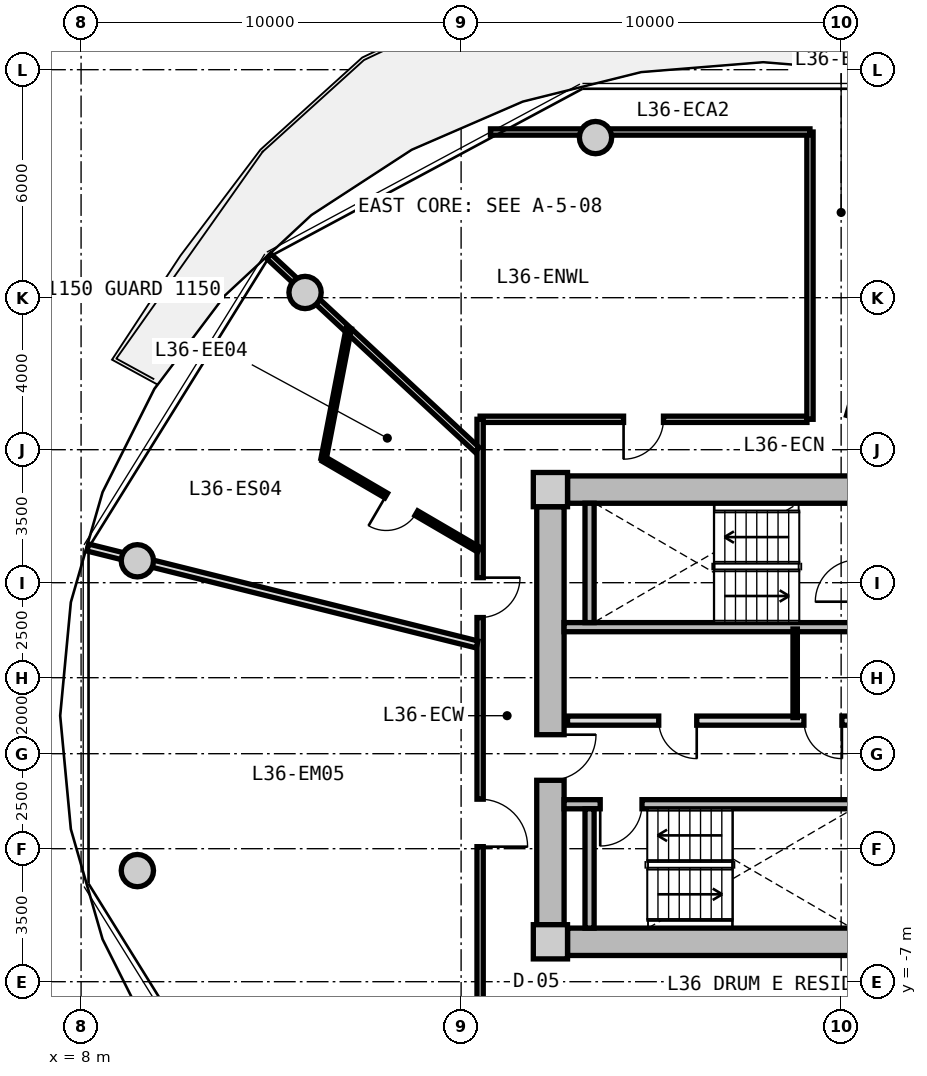
"""IFC4 building model, lengths in metres.
Left out: names, types, materials, properties, quantities, classifications, styles, units other than length and angle.
Written with IfcOpenShell. Run it as: python <this file> out.ifc"""

import sys

from ifc_helpers import new_model, si_unit, direction, frame, frame_2d, origin, origin_2d, place, context, subcontext, project, spatial, rectangle, circle, extrude, source, transform, mapped, element, fill, save


model = new_model("IFC4")
c1 = context("Model", 3, precision=1e-05, world=origin(), true_north=direction((0.0, 1.0)))
c2 = subcontext(c1, "Body", "Model", "MODEL_VIEW")
j1 = project(units=[si_unit("LENGTHUNIT", "METRE"), si_unit("PLANEANGLEUNIT", "RADIAN")], contexts=[c1])
p1 = place(None, origin())
s1 = spatial("IfcSite", under=j1, at=p1, CompositionType="ELEMENT")
p2 = place(p1, origin())
s2 = spatial("IfcBuilding", under=s1, at=p2, CompositionType="ELEMENT")
p3 = place(p2, frame((0.0, 0.0, 117.6)))
s3 = spatial("IfcBuildingStorey", under=s2, at=p3, CompositionType="ELEMENT", Elevation=117.6)
m1 = source(origin(), c2, "Body", "SweptSolid", [
    extrude(rectangle(XDim=0.9, YDim=0.9, at=origin_2d()), origin(), (0.0, 0.0, 1.0), 3.05),
])
for number, where, z_axis, x_axis in (
    (1, (20.35, -5.95, 0.0), (0.0, 0.0, 1.0), (1.0, 0.0, 0.0)),
    (2, (20.35, 5.95, 0.0), (0.0, 0.0, 1.0), (1.0, 0.0, 0.0)),
):
    element("IfcColumn", number, at=place(p3, frame(where, z_axis=z_axis, x_axis=x_axis)), inside=s3, PredefinedType="COLUMN", context=c2, shape_type="MappedRepresentation", body=[
        mapped(m1, transform((0.0, 0.0, 0.0), x_axis=(1.0, 0.0, 0.0), y_axis=(0.0, 1.0, 0.0), z_axis=(0.0, 0.0, 1.0), scale=1.0)),
    ])
m2 = source(origin(), c2, "Body", "SweptSolid", [
    extrude(rectangle(XDim=14.4, YDim=0.72, at=frame_2d((7.2, 0.0))), origin(), (0.0, 0.0, 1.0), 2.79),
])
for number, where, z_axis, x_axis in (
    (3, (20.8, 5.95, 0.0), (0.0, 0.0, 1.0), (1.0, 0.0, 0.0)),
    (4, (35.2, -5.95, 0.0), (0.0, 0.0, 1.0), (-1.0, 0.0, 0.0)),
):
    element("IfcWall", number, at=place(p3, frame(where, z_axis=z_axis, x_axis=x_axis)), inside=s3, PredefinedType="SHEAR", context=c2, shape_type="MappedRepresentation", body=[
        mapped(m2, transform((0.0, 0.0, 0.0), x_axis=(1.0, 0.0, 0.0), y_axis=(0.0, 1.0, 0.0), z_axis=(0.0, 0.0, 1.0), scale=1.0)),
    ])
m3 = source(origin(), c2, "Body", "SweptSolid", [
    extrude(rectangle(XDim=11.0, YDim=0.72, at=frame_2d((5.5, 0.0))), origin(), (0.0, 0.0, 1.0), 2.79),
])
p4 = place(p3, frame((20.35, -5.5, 0.0), z_axis=(0.0, 0.0, 1.0), x_axis=(0.0, 1.0, 0.0)))
e5 = element("IfcWall", 5, at=p4, inside=s3, PredefinedType="SHEAR", context=c2, shape_type="MappedRepresentation", body=[
    mapped(m3, transform((0.0, 0.0, 0.0), x_axis=(1.0, 0.0, 0.0), y_axis=(0.0, 1.0, 0.0), z_axis=(0.0, 0.0, 1.0), scale=1.0)),
])
p5 = place(p4, frame((3.8, 0.0, 0.0)))
e6 = element("IfcOpeningElement", 6, at=p5, cuts=e5, PredefinedType="OPENING", context=c2, shape_type="SweptSolid", body=[
    extrude(rectangle(XDim=1.2, YDim=2.15, at=frame_2d((0.6, 1.075))), frame((0.0, 0.37, 0.0), z_axis=(0.0, -1.0, 0.0), x_axis=(1.0, 0.0, 0.0)), (0.0, 0.0, 1.0), 0.74),
])
m4 = source(origin(), c2, "Body", "SweptSolid", [
    extrude(circle(Radius=0.425, at=origin_2d()), origin(), (0.0, 0.0, 1.0), 3.05),
])
for number, where, z_axis, x_axis in (
    (7, (21.537, 15.213, 0.0), (0.0, 0.0, 1.0), (1.0, 0.0, 0.0)),
    (8, (13.894, 11.137, 0.0), (0.0, 0.0, 1.0), (1.0, 0.0, 0.0)),
    (9, (9.481, 4.076, 0.0), (0.0, 0.0, 1.0), (1.0, 0.0, 0.0)),
    (10, (9.481, -4.076, 0.0), (0.0, 0.0, 1.0), (1.0, 0.0, 0.0)),
):
    element("IfcColumn", number, at=place(p3, frame(where, z_axis=z_axis, x_axis=x_axis)), inside=s3, PredefinedType="COLUMN", context=c2, shape_type="MappedRepresentation", body=[
        mapped(m4, transform((0.0, 0.0, 0.0), x_axis=(1.0, 0.0, 0.0), y_axis=(0.0, 1.0, 0.0), z_axis=(0.0, 0.0, 1.0), scale=1.0)),
    ])
m5 = source(origin(), c2, "Body", "SweptSolid", [
    extrude(rectangle(XDim=7.83, YDim=0.24, at=frame_2d((3.915, 0.0))), origin(), (0.0, 0.0, 1.0), 2.79),
])
p6 = place(p3, frame((20.71, 2.33, 0.0), z_axis=(0.0, 0.0, 1.0), x_axis=(1.0, 0.0, 0.0)))
e11 = element("IfcWall", 11, at=p6, inside=s3, PredefinedType="PARTITIONING", context=c2, shape_type="MappedRepresentation", body=[
    mapped(m5, transform((0.0, 0.0, 0.0), x_axis=(1.0, 0.0, 0.0), y_axis=(0.0, 1.0, 0.0), z_axis=(0.0, 0.0, 1.0), scale=1.0)),
])
m6 = source(origin(), c2, "Body", "SweptSolid", [
    extrude(rectangle(XDim=3.14, YDim=0.24, at=frame_2d((1.57, 0.0))), origin(), (0.0, 0.0, 1.0), 2.79),
])
p7 = place(p3, frame((21.38, 2.45, 0.0), z_axis=(0.0, 0.0, 1.0), x_axis=(0.0, 1.0, 0.0)))
e12 = element("IfcWall", 12, at=p7, inside=s3, PredefinedType="PARTITIONING", context=c2, shape_type="MappedRepresentation", body=[
    mapped(m6, transform((0.0, 0.0, 0.0), x_axis=(1.0, 0.0, 0.0), y_axis=(0.0, 1.0, 0.0), z_axis=(0.0, 0.0, 1.0), scale=1.0)),
])
p8 = place(p3, frame((20.71, -2.33, 0.0), z_axis=(0.0, 0.0, 1.0), x_axis=(1.0, 0.0, 0.0)))
e13 = element("IfcWall", 13, at=p8, inside=s3, PredefinedType="PARTITIONING", context=c2, shape_type="MappedRepresentation", body=[
    mapped(m5, transform((0.0, 0.0, 0.0), x_axis=(1.0, 0.0, 0.0), y_axis=(0.0, 1.0, 0.0), z_axis=(0.0, 0.0, 1.0), scale=1.0)),
])
p9 = place(p8, frame((0.95, 0.0, 0.0)))
e14 = element("IfcOpeningElement", 14, at=p9, cuts=e13, PredefinedType="OPENING", context=c2, shape_type="SweptSolid", body=[
    extrude(rectangle(XDim=1.1, YDim=2.15, at=frame_2d((0.55, 1.075))), frame((0.0, 0.13, 0.0), z_axis=(0.0, -1.0, 0.0), x_axis=(1.0, 0.0, 0.0)), (0.0, 0.0, 1.0), 0.26),
])
p10 = place(p3, frame((21.38, -5.59, 0.0), z_axis=(0.0, 0.0, 1.0), x_axis=(0.0, 1.0, 0.0)))
e15 = element("IfcWall", 15, at=p10, inside=s3, PredefinedType="PARTITIONING", context=c2, shape_type="MappedRepresentation", body=[
    mapped(m6, transform((0.0, 0.0, 0.0), x_axis=(1.0, 0.0, 0.0), y_axis=(0.0, 1.0, 0.0), z_axis=(0.0, 0.0, 1.0), scale=1.0)),
])
m7 = source(origin(), c2, "Body", "SweptSolid", [
    extrude(rectangle(XDim=7.62, YDim=0.24, at=frame_2d((3.81, 0.0))), origin(), (0.0, 0.0, 1.0), 2.775),
])
p11 = place(p3, frame((20.8, -0.13, 0.0), z_axis=(0.0, 0.0, 1.0), x_axis=(1.0, 0.0, 0.0)))
e16 = element("IfcWall", 16, at=p11, inside=s3, PredefinedType="PARTITIONING", context=c2, shape_type="MappedRepresentation", body=[
    mapped(m7, transform((0.0, 0.0, 0.0), x_axis=(1.0, 0.0, 0.0), y_axis=(0.0, 1.0, 0.0), z_axis=(0.0, 0.0, 1.0), scale=1.0)),
])
p12 = place(p11, frame((6.22, 0.0, 0.0)))
e17 = element("IfcOpeningElement", 17, at=p12, cuts=e16, PredefinedType="OPENING", context=c2, shape_type="SweptSolid", body=[
    extrude(rectangle(XDim=1.0, YDim=2.1, at=frame_2d((0.5, 1.05))), frame((0.0, 0.13, 0.0), z_axis=(0.0, -1.0, 0.0), x_axis=(1.0, 0.0, 0.0)), (0.0, 0.0, 1.0), 0.26),
])
p13 = place(p11, frame((2.4, 0.0, 0.0)))
e18 = element("IfcOpeningElement", 18, at=p13, cuts=e16, PredefinedType="OPENING", context=c2, shape_type="SweptSolid", body=[
    extrude(rectangle(XDim=1.0, YDim=2.1, at=frame_2d((0.5, 1.05))), frame((0.0, 0.13, 0.0), z_axis=(0.0, -1.0, 0.0), x_axis=(1.0, 0.0, 0.0)), (0.0, 0.0, 1.0), 0.26),
])
m8 = source(origin(), c2, "Body", "SweptSolid", [
    extrude(rectangle(XDim=2.33, YDim=0.115, at=frame_2d((1.165, 0.0))), origin(), (0.0, 0.0, 1.0), 2.775),
])
p14 = place(p3, frame((26.79, -0.05, 0.0), z_axis=(0.0, 0.0, 1.0), x_axis=(0.0, 1.0, 0.0)))
e19 = element("IfcWall", 19, at=p14, inside=s3, PredefinedType="PARTITIONING", context=c2, shape_type="MappedRepresentation", body=[
    mapped(m8, transform((0.0, 0.0, 0.0), x_axis=(1.0, 0.0, 0.0), y_axis=(0.0, 1.0, 0.0), z_axis=(0.0, 0.0, 1.0), scale=1.0)),
])
m9 = source(origin(), c2, "Body", "SweptSolid", [
    extrude(rectangle(XDim=8.6, YDim=0.165, at=frame_2d((4.3, 0.0))), origin(), (0.0, 0.0, 1.0), 2.775),
])
p15 = place(p3, frame((18.5, 7.8, 0.0), z_axis=(0.0, 0.0, 1.0), x_axis=(1.0, 0.0, 0.0)))
e20 = element("IfcWall", 20, at=p15, inside=s3, PredefinedType="PARTITIONING", context=c2, shape_type="MappedRepresentation", body=[
    mapped(m9, transform((0.0, 0.0, 0.0), x_axis=(1.0, 0.0, 0.0), y_axis=(0.0, 1.0, 0.0), z_axis=(0.0, 0.0, 1.0), scale=1.0)),
])
p16 = place(p15, frame((3.775, 0.0, 0.0)))
e21 = element("IfcOpeningElement", 21, at=p16, cuts=e20, PredefinedType="OPENING", context=c2, shape_type="SweptSolid", body=[
    extrude(rectangle(XDim=1.05, YDim=2.15, at=frame_2d((0.525, 1.075))), frame((0.0, 0.093, 0.0), z_axis=(0.0, -1.0, 0.0), x_axis=(1.0, 0.0, 0.0)), (0.0, 0.0, 1.0), 0.185),
])
m10 = source(origin(), c2, "Body", "SweptSolid", [
    extrude(rectangle(XDim=15.6, YDim=0.165, at=frame_2d((7.8, 0.0))), origin(), (0.0, 0.0, 1.0), 2.775),
])
p17 = place(p3, frame((18.5, -7.8, 0.0), z_axis=(0.0, 0.0, 1.0), x_axis=(0.0, 1.0, 0.0)))
e22 = element("IfcWall", 22, at=p17, inside=s3, PredefinedType="PARTITIONING", context=c2, shape_type="MappedRepresentation", body=[
    mapped(m10, transform((0.0, 0.0, 0.0), x_axis=(1.0, 0.0, 0.0), y_axis=(0.0, 1.0, 0.0), z_axis=(0.0, 0.0, 1.0), scale=1.0)),
])
p18 = place(p17, frame((10.383, 0.0, 0.0)))
e23 = element("IfcOpeningElement", 23, at=p18, cuts=e22, PredefinedType="OPENING", context=c2, shape_type="SweptSolid", body=[
    extrude(rectangle(XDim=1.05, YDim=2.15, at=frame_2d((0.525, 1.075))), frame((0.0, 0.093, 0.0), z_axis=(0.0, -1.0, 0.0), x_axis=(1.0, 0.0, 0.0)), (0.0, 0.0, 1.0), 0.185),
])
p19 = place(p17, frame((4.353, 0.0, 0.0)))
e24 = element("IfcOpeningElement", 24, at=p19, cuts=e22, PredefinedType="OPENING", context=c2, shape_type="SweptSolid", body=[
    extrude(rectangle(XDim=1.25, YDim=2.2, at=frame_2d((0.625, 1.1))), frame((0.0, 0.093, 0.0), z_axis=(0.0, -1.0, 0.0), x_axis=(1.0, 0.0, 0.0)), (0.0, 0.0, 1.0), 0.185),
])
m11 = source(origin(), c2, "Body", "SweptSolid", [
    extrude(rectangle(XDim=8.989, YDim=0.165, at=frame_2d((4.495, 0.0))), origin(), (0.0, 0.0, 1.0), 2.415),
])
p20 = place(p3, frame((28.222, 7.88, 0.0), z_axis=(0.0, 0.0, 1.0), x_axis=(0.27702323008, 0.960863221274, 0.0)))
e25 = element("IfcWall", 25, at=p20, inside=s3, PredefinedType="PARTITIONING", context=c2, shape_type="MappedRepresentation", body=[
    mapped(m11, transform((0.0, 0.0, 0.0), x_axis=(1.0, 0.0, 0.0), y_axis=(0.0, 1.0, 0.0), z_axis=(0.0, 0.0, 1.0), scale=1.0)),
])
m12 = source(origin(), c2, "Body", "SweptSolid", [
    extrude(rectangle(XDim=7.482, YDim=0.165, at=frame_2d((3.741, 0.0))), origin(), (0.0, 0.0, 1.0), 2.275),
])
p21 = place(p3, frame((18.42, 6.998, 0.0), z_axis=(0.0, 0.0, 1.0), x_axis=(-0.732508698043, 0.680757671489, 0.0)))
e26 = element("IfcWall", 26, at=p21, inside=s3, PredefinedType="PARTITIONING", context=c2, shape_type="MappedRepresentation", body=[
    mapped(m12, transform((0.0, 0.0, 0.0), x_axis=(1.0, 0.0, 0.0), y_axis=(0.0, 1.0, 0.0), z_axis=(0.0, 0.0, 1.0), scale=1.0)),
])
m13 = source(origin(), c2, "Body", "SweptSolid", [
    extrude(rectangle(XDim=7.56, YDim=0.165, at=frame_2d((3.78, 0.0))), origin(), (0.0, 0.0, 1.0), 2.775),
])
p22 = place(p3, frame((27.18, 7.8, 0.0), z_axis=(0.0, 0.0, 1.0), x_axis=(0.0, 1.0, 0.0)))
e27 = element("IfcWall", 27, at=p22, inside=s3, PredefinedType="PARTITIONING", context=c2, shape_type="MappedRepresentation", body=[
    mapped(m13, transform((0.0, 0.0, 0.0), x_axis=(1.0, 0.0, 0.0), y_axis=(0.0, 1.0, 0.0), z_axis=(0.0, 0.0, 1.0), scale=1.0)),
])
m14 = source(origin(), c2, "Body", "SweptSolid", [
    extrude(rectangle(XDim=8.407, YDim=0.165, at=frame_2d((4.204, 0.0))), origin(), (0.0, 0.0, 1.0), 2.275),
])
p23 = place(p3, frame((18.773, 15.36, 0.0), z_axis=(0.0, 0.0, 1.0), x_axis=(1.0, 0.0, 0.0)))
e28 = element("IfcWall", 28, at=p23, inside=s3, PredefinedType="PARTITIONING", context=c2, shape_type="MappedRepresentation", body=[
    mapped(m14, transform((0.0, 0.0, 0.0), x_axis=(1.0, 0.0, 0.0), y_axis=(0.0, 1.0, 0.0), z_axis=(0.0, 0.0, 1.0), scale=1.0)),
])
m15 = source(origin(), c2, "Body", "SweptSolid", [
    extrude(rectangle(XDim=10.556, YDim=0.19, at=frame_2d((5.278, 0.0))), origin(), (0.0, 0.0, 1.0), 2.275),
])
p24 = place(p3, frame((18.42, 1.875, 0.0), z_axis=(0.0, 0.0, 1.0), x_axis=(-0.970363857851, 0.241648470667, 0.0)))
e29 = element("IfcWall", 29, at=p24, inside=s3, PredefinedType="PARTITIONING", context=c2, shape_type="MappedRepresentation", body=[
    mapped(m15, transform((0.0, 0.0, 0.0), x_axis=(1.0, 0.0, 0.0), y_axis=(0.0, 1.0, 0.0), z_axis=(0.0, 0.0, 1.0), scale=1.0)),
])
m16 = source(origin(), c2, "Body", "SweptSolid", [
    extrude(rectangle(XDim=4.735, YDim=0.14, at=frame_2d((2.368, 0.0))), origin(), (0.0, 0.0, 1.0), 2.775),
])
p25 = place(p3, frame((18.47, 4.368, 0.0), z_axis=(0.0, 0.0, 1.0), x_axis=(-0.863537576642, 0.504284496814, 0.0)))
e30 = element("IfcWall", 30, at=p25, inside=s3, PredefinedType="PARTITIONING", context=c2, shape_type="MappedRepresentation", body=[
    mapped(m16, transform((0.0, 0.0, 0.0), x_axis=(1.0, 0.0, 0.0), y_axis=(0.0, 1.0, 0.0), z_axis=(0.0, 0.0, 1.0), scale=1.0)),
])
p26 = place(p25, frame((1.908, 0.0, 0.0)))
e31 = element("IfcOpeningElement", 31, at=p26, cuts=e30, PredefinedType="OPENING", context=c2, shape_type="SweptSolid", body=[
    extrude(rectangle(XDim=0.92, YDim=2.1, at=frame_2d((0.46, 1.05))), frame((0.0, 0.08, 0.0), z_axis=(0.0, -1.0, 0.0), x_axis=(1.0, 0.0, 0.0)), (0.0, 0.0, 1.0), 0.16),
])
m17 = source(origin(), c2, "Body", "SweptSolid", [
    extrude(rectangle(XDim=3.499, YDim=0.14, at=frame_2d((1.75, 0.0))), origin(), (0.0, 0.0, 1.0), 2.775),
])
p27 = place(p3, frame((14.381, 6.756, 0.0), z_axis=(0.0, 0.0, 1.0), x_axis=(0.18957713629, 0.981865830649, 0.0)))
e32 = element("IfcWall", 32, at=p27, inside=s3, PredefinedType="PARTITIONING", context=c2, shape_type="MappedRepresentation", body=[
    mapped(m17, transform((0.0, 0.0, 0.0), x_axis=(1.0, 0.0, 0.0), y_axis=(0.0, 1.0, 0.0), z_axis=(0.0, 0.0, 1.0), scale=1.0)),
])
m18 = source(origin(), c2, "Body", "SweptSolid", [
    extrude(rectangle(XDim=1.1, YDim=2.15, at=frame_2d((0.55, 1.075))), frame((0.0, 0.025, 0.0), z_axis=(0.0, -1.0, 0.0), x_axis=(1.0, 0.0, 0.0)), (0.0, 0.0, 1.0), 0.05),
])
p28 = place(p9, frame((1.1, 0.0, 0.0), z_axis=(0.0, 0.0, 1.0), x_axis=(-1.0, 0.0, 0.0)))
e33 = element("IfcDoor", 33, at=p28, inside=s3, OperationType="SINGLE_SWING_RIGHT", PredefinedType="DOOR", context=c2, shape_type="MappedRepresentation", body=[
    mapped(m18, transform((0.0, 0.0, 0.0), x_axis=(1.0, 0.0, 0.0), y_axis=(0.0, 1.0, 0.0), z_axis=(0.0, 0.0, 1.0), scale=1.0)),
])
fill(e14, e33)
m19 = source(origin(), c2, "Body", "SweptSolid", [
    extrude(rectangle(XDim=1.2, YDim=2.15, at=frame_2d((0.6, 1.075))), frame((0.0, 0.025, 0.0), z_axis=(0.0, -1.0, 0.0), x_axis=(1.0, 0.0, 0.0)), (0.0, 0.0, 1.0), 0.05),
])
p29 = place(p5, frame((1.2, 0.0, 0.0), z_axis=(0.0, 0.0, 1.0), x_axis=(-1.0, 0.0, 0.0)))
e34 = element("IfcDoor", 34, at=p29, inside=s3, OperationType="SINGLE_SWING_LEFT", PredefinedType="DOOR", context=c2, shape_type="MappedRepresentation", body=[
    mapped(m19, transform((0.0, 0.0, 0.0), x_axis=(1.0, 0.0, 0.0), y_axis=(0.0, 1.0, 0.0), z_axis=(0.0, 0.0, 1.0), scale=1.0)),
])
fill(e6, e34)
m20 = source(origin(), c2, "Body", "SweptSolid", [
    extrude(rectangle(XDim=1.0, YDim=2.1, at=frame_2d((0.5, 1.05))), frame((0.0, 0.025, 0.0), z_axis=(0.0, -1.0, 0.0), x_axis=(1.0, 0.0, 0.0)), (0.0, 0.0, 1.0), 0.05),
])
p30 = place(p12, frame((1.0, 0.0, 0.0), z_axis=(0.0, 0.0, 1.0), x_axis=(-1.0, 0.0, 0.0)))
e35 = element("IfcDoor", 35, at=p30, inside=s3, OperationType="SINGLE_SWING_LEFT", PredefinedType="DOOR", context=c2, shape_type="MappedRepresentation", body=[
    mapped(m20, transform((0.0, 0.0, 0.0), x_axis=(1.0, 0.0, 0.0), y_axis=(0.0, 1.0, 0.0), z_axis=(0.0, 0.0, 1.0), scale=1.0)),
])
fill(e17, e35)
p31 = place(p13, frame((1.0, 0.0, 0.0), z_axis=(0.0, 0.0, 1.0), x_axis=(-1.0, 0.0, 0.0)))
e36 = element("IfcDoor", 36, at=p31, inside=s3, OperationType="SINGLE_SWING_LEFT", PredefinedType="DOOR", context=c2, shape_type="MappedRepresentation", body=[
    mapped(m20, transform((0.0, 0.0, 0.0), x_axis=(1.0, 0.0, 0.0), y_axis=(0.0, 1.0, 0.0), z_axis=(0.0, 0.0, 1.0), scale=1.0)),
])
fill(e18, e36)
m21 = source(origin(), c2, "Body", "SweptSolid", [
    extrude(rectangle(XDim=1.05, YDim=2.15, at=frame_2d((0.525, 1.075))), frame((0.0, 0.025, 0.0), z_axis=(0.0, -1.0, 0.0), x_axis=(1.0, 0.0, 0.0)), (0.0, 0.0, 1.0), 0.05),
])
p32 = place(p16, frame((1.05, 0.0, 0.0), z_axis=(0.0, 0.0, 1.0), x_axis=(-1.0, 0.0, 0.0)))
e37 = element("IfcDoor", 37, at=p32, inside=s3, OperationType="SINGLE_SWING_RIGHT", PredefinedType="DOOR", context=c2, shape_type="MappedRepresentation", body=[
    mapped(m21, transform((0.0, 0.0, 0.0), x_axis=(1.0, 0.0, 0.0), y_axis=(0.0, 1.0, 0.0), z_axis=(0.0, 0.0, 1.0), scale=1.0)),
])
fill(e21, e37)
p33 = place(p18, frame((1.05, 0.0, 0.0), z_axis=(0.0, 0.0, 1.0), x_axis=(-1.0, 0.0, 0.0)))
e38 = element("IfcDoor", 38, at=p33, inside=s3, OperationType="SINGLE_SWING_LEFT", PredefinedType="DOOR", context=c2, shape_type="MappedRepresentation", body=[
    mapped(m21, transform((0.0, 0.0, 0.0), x_axis=(1.0, 0.0, 0.0), y_axis=(0.0, 1.0, 0.0), z_axis=(0.0, 0.0, 1.0), scale=1.0)),
])
fill(e23, e38)
m22 = source(origin(), c2, "Body", "SweptSolid", [
    extrude(rectangle(XDim=0.92, YDim=2.1, at=frame_2d((0.46, 1.05))), frame((0.0, 0.025, 0.0), z_axis=(0.0, -1.0, 0.0), x_axis=(1.0, 0.0, 0.0)), (0.0, 0.0, 1.0), 0.05),
])
p34 = place(p26, origin())
e39 = element("IfcDoor", 39, at=p34, inside=s3, OperationType="SINGLE_SWING_RIGHT", PredefinedType="DOOR", context=c2, shape_type="MappedRepresentation", body=[
    mapped(m22, transform((0.0, 0.0, 0.0), x_axis=(1.0, 0.0, 0.0), y_axis=(0.0, 1.0, 0.0), z_axis=(0.0, 0.0, 1.0), scale=1.0)),
])
fill(e31, e39)
m23 = source(origin(), c2, "Body", "SweptSolid", [
    extrude(rectangle(XDim=1.25, YDim=2.2, at=frame_2d((0.625, 1.1))), frame((0.0, 0.025, 0.0), z_axis=(0.0, -1.0, 0.0), x_axis=(1.0, 0.0, 0.0)), (0.0, 0.0, 1.0), 0.05),
])
p35 = place(p19, frame((1.25, 0.0, 0.0), z_axis=(0.0, 0.0, 1.0), x_axis=(-1.0, 0.0, 0.0)))
e40 = element("IfcDoor", 40, at=p35, inside=s3, OperationType="SINGLE_SWING_RIGHT", PredefinedType="DOOR", context=c2, shape_type="MappedRepresentation", body=[
    mapped(m23, transform((0.0, 0.0, 0.0), x_axis=(1.0, 0.0, 0.0), y_axis=(0.0, 1.0, 0.0), z_axis=(0.0, 0.0, 1.0), scale=1.0)),
])
fill(e24, e40)
save(model, sys.argv[1])
